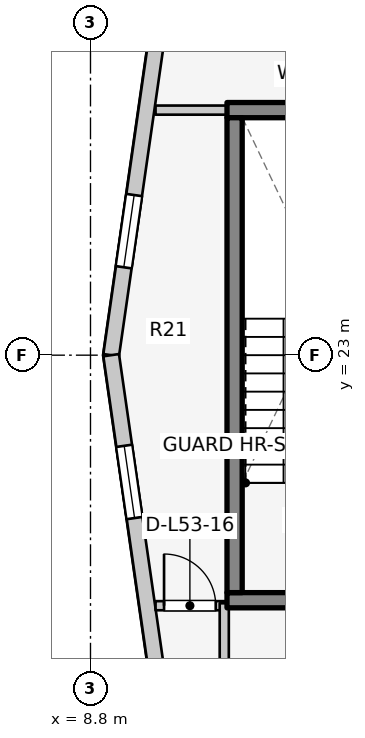
"""IFC4 building model, lengths in metres.
Left out: names, types, materials, properties, quantities, classifications, styles, units other than length and angle.
Written with IfcOpenShell. Run it as: python <this file> out.ifc"""

import sys

from ifc_helpers import new_model, si_unit, direction, frame, frame_2d, origin, place, context, subcontext, project, spatial, rectangle, extrude, element, fill, save


model = new_model("IFC4")
c1 = context("Model", 3, precision=1e-05, world=origin(), true_north=direction((0.0, 1.0)))
c2 = subcontext(c1, "Body", "Model", "MODEL_VIEW")
j1 = project(units=[si_unit("LENGTHUNIT", "METRE"), si_unit("PLANEANGLEUNIT", "RADIAN")], contexts=[c1])
p1 = place(None, origin())
s1 = spatial("IfcSite", under=j1, at=p1, CompositionType="ELEMENT")
p2 = place(p1, origin())
s2 = spatial("IfcBuilding", under=s1, at=p2, CompositionType="ELEMENT")
p3 = place(p2, frame((0.0, 0.0, 174.6)))
s3 = spatial("IfcBuildingStorey", under=s2, at=p3, CompositionType="ELEMENT", Elevation=174.6)
p4 = place(p3, frame((11.045, 18.97, 0.0), z_axis=(0.0, 0.0, 1.0), x_axis=(1.0, 0.0, 0.0)))
e1 = element("IfcWall", 1, at=p4, inside=s3, PredefinedType="SOLIDWALL", context=c2, shape_type="SweptSolid", body=[
    extrude(rectangle(XDim=3.782, YDim=0.25, at=frame_2d((1.891, 0.0))), origin(), (0.0, 0.0, 1.0), 3.1),
])
p5 = place(p4, frame((1.135, 0.0, 0.0)))
e2 = element("IfcOpeningElement", 2, at=p5, cuts=e1, PredefinedType="OPENING", context=c2, shape_type="SweptSolid", body=[
    extrude(rectangle(XDim=1.1, YDim=2.1, at=frame_2d((0.55, 1.05))), frame((0.0, 0.135, 0.0), z_axis=(0.0, -1.0, 0.0), x_axis=(1.0, 0.0, 0.0)), (0.0, 0.0, 1.0), 0.27),
])
p6 = place(p3, frame((11.045, 27.03, 0.0), z_axis=(0.0, 0.0, 1.0), x_axis=(1.0, 0.0, 0.0)))
e3 = element("IfcWall", 3, at=p6, inside=s3, PredefinedType="SOLIDWALL", context=c2, shape_type="SweptSolid", body=[
    extrude(rectangle(XDim=3.782, YDim=0.25, at=frame_2d((1.891, 0.0))), origin(), (0.0, 0.0, 1.0), 3.1),
])
p7 = place(p3, frame((11.17, 19.095, 0.0), z_axis=(0.0, 0.0, 1.0), x_axis=(0.0, 1.0, 0.0)))
e4 = element("IfcWall", 4, at=p7, inside=s3, PredefinedType="SOLIDWALL", context=c2, shape_type="SweptSolid", body=[
    extrude(rectangle(XDim=7.81, YDim=0.25, at=frame_2d((3.905, 0.0))), origin(), (0.0, 0.0, 1.0), 3.1),
])
p8 = place(p3, frame((9.93, 28.497, 0.0), z_axis=(0.0, 0.0, 1.0), x_axis=(-0.142227632286, -0.989833976288, 0.0)))
e5 = element("IfcWall", 5, at=p8, inside=s3, PredefinedType="STANDARD", context=c2, shape_type="SweptSolid", body=[
    extrude(rectangle(XDim=5.553, YDim=0.26, at=frame_2d((2.776, 0.0))), origin(), (0.0, 0.0, 1.0), 2.85),
])
p9 = place(p8, frame((2.892, 0.0, 0.75)))
e6 = element("IfcOpeningElement", 6, at=p9, cuts=e5, PredefinedType="OPENING", context=c2, shape_type="SweptSolid", body=[
    extrude(rectangle(XDim=1.2, YDim=1.5, at=frame_2d((0.6, 0.75))), frame((0.0, 0.14, 0.0), z_axis=(0.0, -1.0, 0.0), x_axis=(1.0, 0.0, 0.0)), (0.0, 0.0, 1.0), 0.28),
])
p10 = place(p3, frame((9.14, 23.0, 0.0), z_axis=(0.0, 0.0, 1.0), x_axis=(0.142227632286, -0.989833976288, 0.0)))
e7 = element("IfcWall", 7, at=p10, inside=s3, PredefinedType="STANDARD", context=c2, shape_type="SweptSolid", body=[
    extrude(rectangle(XDim=5.553, YDim=0.26, at=frame_2d((2.776, 0.0))), origin(), (0.0, 0.0, 1.0), 2.85),
])
p11 = place(p10, frame((1.506, 0.0, 0.75)))
e8 = element("IfcOpeningElement", 8, at=p11, cuts=e7, PredefinedType="OPENING", context=c2, shape_type="SweptSolid", body=[
    extrude(rectangle(XDim=1.2, YDim=1.5, at=frame_2d((0.6, 0.75))), frame((0.0, 0.14, 0.0), z_axis=(0.0, -1.0, 0.0), x_axis=(1.0, 0.0, 0.0)), (0.0, 0.0, 1.0), 0.28),
])
p12 = place(p3, frame((9.87, 27.03, 0.0), z_axis=(0.0, 0.0, 1.0), x_axis=(1.0, 0.0, 0.0)))
e9 = element("IfcWall", 9, at=p12, inside=s3, PredefinedType="PARTITIONING", context=c2, shape_type="SweptSolid", body=[
    extrude(rectangle(XDim=1.17, YDim=0.15, at=frame_2d((0.585, 0.0))), origin(), (0.0, 0.0, 1.0), 2.855),
])
p13 = place(p3, frame((9.87, 18.88, 0.0), z_axis=(0.0, 0.0, 1.0), x_axis=(1.0, 0.0, 0.0)))
e10 = element("IfcWall", 10, at=p13, inside=s3, PredefinedType="PARTITIONING", context=c2, shape_type="SweptSolid", body=[
    extrude(rectangle(XDim=1.17, YDim=0.15, at=frame_2d((0.585, 0.0))), origin(), (0.0, 0.0, 1.0), 2.855),
])
p14 = place(p13, frame((0.14, 0.0, 0.0)))
e11 = element("IfcOpeningElement", 11, at=p14, cuts=e10, PredefinedType="OPENING", context=c2, shape_type="SweptSolid", body=[
    extrude(rectangle(XDim=0.85, YDim=2.05, at=frame_2d((0.425, 1.025))), frame((0.0, 0.085, 0.0), z_axis=(0.0, -1.0, 0.0), x_axis=(1.0, 0.0, 0.0)), (0.0, 0.0, 1.0), 0.17),
])
p15 = place(p3, frame((11.0, 15.91, 0.0), z_axis=(0.0, 0.0, 1.0), x_axis=(0.0, 1.0, 0.0)))
e12 = element("IfcWall", 12, at=p15, inside=s3, PredefinedType="PARTITIONING", context=c2, shape_type="SweptSolid", body=[
    extrude(rectangle(XDim=3.01, YDim=0.15, at=frame_2d((1.505, 0.0))), origin(), (0.0, 0.0, 1.0), 2.855),
])
p16 = place(p9, origin())
e13 = element("IfcWindow", 13, at=p16, inside=s3, PartitioningType="SINGLE_PANEL", PredefinedType="WINDOW", context=c2, shape_type="SweptSolid", body=[
    extrude(rectangle(XDim=1.2, YDim=1.5, at=frame_2d((0.6, 0.75))), frame((0.0, 0.03, 0.0), z_axis=(0.0, -1.0, 0.0), x_axis=(1.0, 0.0, 0.0)), (0.0, 0.0, 1.0), 0.06),
])
fill(e6, e13)
p17 = place(p11, origin())
e14 = element("IfcWindow", 14, at=p17, inside=s3, PartitioningType="SINGLE_PANEL", PredefinedType="WINDOW", context=c2, shape_type="SweptSolid", body=[
    extrude(rectangle(XDim=1.2, YDim=1.5, at=frame_2d((0.6, 0.75))), frame((0.0, 0.03, 0.0), z_axis=(0.0, -1.0, 0.0), x_axis=(1.0, 0.0, 0.0)), (0.0, 0.0, 1.0), 0.06),
])
fill(e8, e14)
p18 = place(p14, origin())
e15 = element("IfcDoor", 15, at=p18, inside=s3, OperationType="SINGLE_SWING_LEFT", PredefinedType="DOOR", context=c2, shape_type="SweptSolid", body=[
    extrude(rectangle(XDim=0.85, YDim=2.05, at=frame_2d((0.425, 1.025))), frame((0.0, 0.025, 0.0), z_axis=(0.0, -1.0, 0.0), x_axis=(1.0, 0.0, 0.0)), (0.0, 0.0, 1.0), 0.05),
])
fill(e11, e15)
save(model, sys.argv[1])
